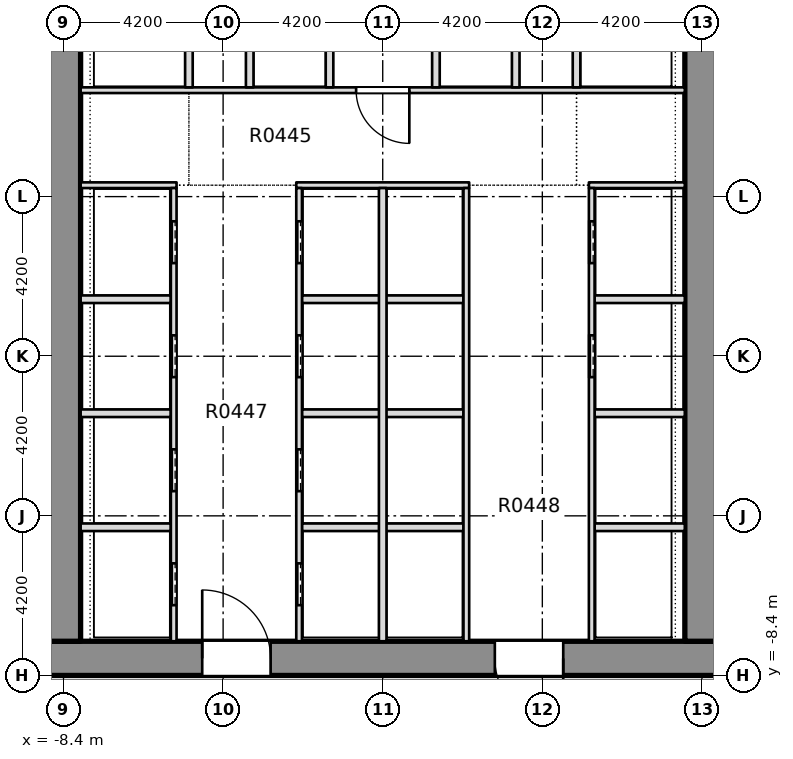
"""IFC4 building model, lengths in metres.
Left out: names, types, materials, properties, quantities, classifications, styles, units other than length and angle.
Written with IfcOpenShell. Run it as: python <this file> out.ifc"""

import sys

from ifc_helpers import new_model, si_unit, direction, frame, frame_2d, origin, place, context, subcontext, project, spatial, rectangle, extrude, element, fill, save


model = new_model("IFC4")
c1 = context("Model", 3, precision=1e-05, world=origin(), true_north=direction((0.0, 1.0)))
c2 = subcontext(c1, "Body", "Model", "MODEL_VIEW")
j1 = project(units=[si_unit("LENGTHUNIT", "METRE"), si_unit("PLANEANGLEUNIT", "RADIAN")], contexts=[c1])
p1 = place(None, origin())
s1 = spatial("IfcSite", under=j1, at=p1, CompositionType="ELEMENT")
p2 = place(p1, origin())
s2 = spatial("IfcBuilding", under=s1, at=p2, CompositionType="ELEMENT")
p3 = place(p2, frame((0.0, 0.0, 25.0)))
s3 = spatial("IfcBuildingStorey", under=s2, at=p3, CompositionType="ELEMENT", Elevation=25.0)
p4 = place(p3, frame((-11.7, -7.95, -0.4), z_axis=(0.0, 0.0, 1.0), x_axis=(1.0, 0.0, 0.0)))
e1 = element("IfcWall", 1, at=p4, inside=s3, PredefinedType="SHEAR", context=c2, shape_type="SweptSolid", body=[
    extrude(rectangle(XDim=23.4, YDim=0.9, at=frame_2d((11.7, 0.0))), origin(), (0.0, 0.0, 1.0), 5.0),
])
p5 = place(p4, frame((6.95, 0.0, 0.4)))
e2 = element("IfcOpeningElement", 2, at=p5, cuts=e1, PredefinedType="OPENING", context=c2, shape_type="SweptSolid", body=[
    extrude(rectangle(XDim=1.8, YDim=2.1, at=frame_2d((0.9, 1.05))), frame((0.0, 0.46, 0.0), z_axis=(0.0, -1.0, 0.0), x_axis=(1.0, 0.0, 0.0)), (0.0, 0.0, 1.0), 0.92),
])
p6 = place(p4, frame((14.65, 0.0, 0.4)))
e3 = element("IfcOpeningElement", 3, at=p6, cuts=e1, PredefinedType="OPENING", context=c2, shape_type="SweptSolid", body=[
    extrude(rectangle(XDim=1.8, YDim=2.1, at=frame_2d((0.9, 1.05))), frame((0.0, 0.46, 0.0), z_axis=(0.0, -1.0, 0.0), x_axis=(1.0, 0.0, 0.0)), (0.0, 0.0, 1.0), 0.92),
])
p7 = place(p3, frame((-8.4, -7.5, -0.4), z_axis=(0.0, 0.0, 1.0), x_axis=(0.0, 1.0, 0.0)))
e4 = element("IfcWall", 4, at=p7, inside=s3, PredefinedType="SHEAR", context=c2, shape_type="SweptSolid", body=[
    extrude(rectangle(XDim=28.35, YDim=0.9, at=frame_2d((14.175, 0.0))), origin(), (0.0, 0.0, 1.0), 5.0),
])
p8 = place(p7, frame((18.4, 0.0, 0.4)))
e5 = element("IfcOpeningElement", 5, at=p8, cuts=e4, PredefinedType="OPENING", context=c2, shape_type="SweptSolid", body=[
    extrude(rectangle(XDim=1.2, YDim=2.1, at=frame_2d((0.6, 1.05))), frame((0.0, 0.46, 0.0), z_axis=(0.0, -1.0, 0.0), x_axis=(1.0, 0.0, 0.0)), (0.0, 0.0, 1.0), 0.92),
])
p9 = place(p3, frame((8.4, -7.5, -0.4), z_axis=(0.0, 0.0, 1.0), x_axis=(0.0, 1.0, 0.0)))
e6 = element("IfcWall", 6, at=p9, inside=s3, PredefinedType="SHEAR", context=c2, shape_type="SweptSolid", body=[
    extrude(rectangle(XDim=28.35, YDim=0.9, at=frame_2d((14.175, 0.0))), origin(), (0.0, 0.0, 1.0), 5.0),
])
p10 = place(p9, frame((18.4, 0.0, 0.4)))
e7 = element("IfcOpeningElement", 7, at=p10, cuts=e6, PredefinedType="OPENING", context=c2, shape_type="SweptSolid", body=[
    extrude(rectangle(XDim=1.2, YDim=2.1, at=frame_2d((0.6, 1.05))), frame((0.0, 0.46, 0.0), z_axis=(0.0, -1.0, 0.0), x_axis=(1.0, 0.0, 0.0)), (0.0, 0.0, 1.0), 0.92),
])
p11 = place(p3, frame((-7.949, -4.5, 0.0), z_axis=(0.0, 0.0, 1.0), x_axis=(1.0, 0.0, 0.0)))
e8 = element("IfcWall", 8, at=p11, inside=s3, PredefinedType="PARTITIONING", context=c2, shape_type="SweptSolid", body=[
    extrude(rectangle(XDim=2.374, YDim=0.2, at=frame_2d((1.187, 0.0))), origin(), (0.0, 0.0, 1.0), 4.6),
])
p12 = place(p3, frame((-2.125, -4.5, 0.0), z_axis=(0.0, 0.0, 1.0), x_axis=(1.0, 0.0, 0.0)))
e9 = element("IfcWall", 9, at=p12, inside=s3, PredefinedType="PARTITIONING", context=c2, shape_type="SweptSolid", body=[
    extrude(rectangle(XDim=4.25, YDim=0.2, at=frame_2d((2.125, 0.0))), origin(), (0.0, 0.0, 1.0), 4.6),
])
for number, where, z_axis, x_axis in (
    (10, (5.575, -4.5, 0.0), (0.0, 0.0, 1.0), (1.0, 0.0, 0.0)),
    (11, (-7.949, -1.5, 0.0), (0.0, 0.0, 1.0), (1.0, 0.0, 0.0)),
):
    element("IfcWall", number, at=place(p3, frame(where, z_axis=z_axis, x_axis=x_axis)), inside=s3, PredefinedType="PARTITIONING", context=c2, shape_type="SweptSolid", body=[
        extrude(rectangle(XDim=2.374, YDim=0.2, at=frame_2d((1.187, 0.0))), origin(), (0.0, 0.0, 1.0), 4.6),
    ])
p13 = place(p3, frame((-2.125, -1.5, 0.0), z_axis=(0.0, 0.0, 1.0), x_axis=(1.0, 0.0, 0.0)))
e12 = element("IfcWall", 12, at=p13, inside=s3, PredefinedType="PARTITIONING", context=c2, shape_type="SweptSolid", body=[
    extrude(rectangle(XDim=4.25, YDim=0.2, at=frame_2d((2.125, 0.0))), origin(), (0.0, 0.0, 1.0), 4.6),
])
for number, where, z_axis, x_axis in (
    (13, (5.575, -1.5, 0.0), (0.0, 0.0, 1.0), (1.0, 0.0, 0.0)),
    (14, (-7.949, 1.5, 0.0), (0.0, 0.0, 1.0), (1.0, 0.0, 0.0)),
):
    element("IfcWall", number, at=place(p3, frame(where, z_axis=z_axis, x_axis=x_axis)), inside=s3, PredefinedType="PARTITIONING", context=c2, shape_type="SweptSolid", body=[
        extrude(rectangle(XDim=2.374, YDim=0.2, at=frame_2d((1.187, 0.0))), origin(), (0.0, 0.0, 1.0), 4.6),
    ])
p14 = place(p3, frame((-2.125, 1.5, 0.0), z_axis=(0.0, 0.0, 1.0), x_axis=(1.0, 0.0, 0.0)))
e15 = element("IfcWall", 15, at=p14, inside=s3, PredefinedType="PARTITIONING", context=c2, shape_type="SweptSolid", body=[
    extrude(rectangle(XDim=4.25, YDim=0.2, at=frame_2d((2.125, 0.0))), origin(), (0.0, 0.0, 1.0), 4.6),
])
p15 = place(p3, frame((5.575, 1.5, 0.0), z_axis=(0.0, 0.0, 1.0), x_axis=(1.0, 0.0, 0.0)))
e16 = element("IfcWall", 16, at=p15, inside=s3, PredefinedType="PARTITIONING", context=c2, shape_type="SweptSolid", body=[
    extrude(rectangle(XDim=2.374, YDim=0.2, at=frame_2d((1.187, 0.0))), origin(), (0.0, 0.0, 1.0), 4.6),
])
p16 = place(p3, frame((-7.949, 4.5, 0.0), z_axis=(0.0, 0.0, 1.0), x_axis=(1.0, 0.0, 0.0)))
e17 = element("IfcWall", 17, at=p16, inside=s3, PredefinedType="PARTITIONING", context=c2, shape_type="SweptSolid", body=[
    extrude(rectangle(XDim=2.524, YDim=0.15, at=frame_2d((1.262, 0.0))), origin(), (0.0, 0.0, 1.0), 4.6),
])
p17 = place(p3, frame((-2.275, 4.5, 0.0), z_axis=(0.0, 0.0, 1.0), x_axis=(1.0, 0.0, 0.0)))
e18 = element("IfcWall", 18, at=p17, inside=s3, PredefinedType="PARTITIONING", context=c2, shape_type="SweptSolid", body=[
    extrude(rectangle(XDim=4.55, YDim=0.15, at=frame_2d((2.275, 0.0))), origin(), (0.0, 0.0, 1.0), 4.6),
])
p18 = place(p3, frame((5.425, 4.5, 0.0), z_axis=(0.0, 0.0, 1.0), x_axis=(1.0, 0.0, 0.0)))
e19 = element("IfcWall", 19, at=p18, inside=s3, PredefinedType="PARTITIONING", context=c2, shape_type="SweptSolid", body=[
    extrude(rectangle(XDim=2.524, YDim=0.15, at=frame_2d((1.262, 0.0))), origin(), (0.0, 0.0, 1.0), 4.6),
])
p19 = place(p3, frame((-7.949, 7.0, 0.0), z_axis=(0.0, 0.0, 1.0), x_axis=(1.0, 0.0, 0.0)))
e20 = element("IfcWall", 20, at=p19, inside=s3, PredefinedType="PARTITIONING", context=c2, shape_type="SweptSolid", body=[
    extrude(rectangle(XDim=15.898, YDim=0.15, at=frame_2d((7.949, 0.0))), origin(), (0.0, 0.0, 1.0), 4.6),
])
p20 = place(p19, frame((7.249, 0.0, 0.0)))
e21 = element("IfcOpeningElement", 21, at=p20, cuts=e20, PredefinedType="OPENING", context=c2, shape_type="SweptSolid", body=[
    extrude(rectangle(XDim=1.4, YDim=2.1, at=frame_2d((0.7, 1.05))), frame((0.0, 0.085, 0.0), z_axis=(0.0, -1.0, 0.0), x_axis=(1.0, 0.0, 0.0)), (0.0, 0.0, 1.0), 0.17),
])
p21 = place(p3, frame((-5.5, -7.499, 0.0), z_axis=(0.0, 0.0, 1.0), x_axis=(0.0, 1.0, 0.0)))
e22 = element("IfcWall", 22, at=p21, inside=s3, PredefinedType="PARTITIONING", context=c2, shape_type="SweptSolid", body=[
    extrude(rectangle(XDim=11.924, YDim=0.15, at=frame_2d((5.962, 0.0))), origin(), (0.0, 0.0, 1.0), 4.6),
])
p22 = place(p21, frame((0.949, 0.0, 0.0)))
e23 = element("IfcOpeningElement", 23, at=p22, cuts=e22, PredefinedType="OPENING", context=c2, shape_type="SweptSolid", body=[
    extrude(rectangle(XDim=1.1, YDim=2.1, at=frame_2d((0.55, 1.05))), frame((0.0, 0.085, 0.0), z_axis=(0.0, -1.0, 0.0), x_axis=(1.0, 0.0, 0.0)), (0.0, 0.0, 1.0), 0.17),
])
p23 = place(p21, frame((3.949, 0.0, 0.0)))
e24 = element("IfcOpeningElement", 24, at=p23, cuts=e22, PredefinedType="OPENING", context=c2, shape_type="SweptSolid", body=[
    extrude(rectangle(XDim=1.1, YDim=2.1, at=frame_2d((0.55, 1.05))), frame((0.0, 0.085, 0.0), z_axis=(0.0, -1.0, 0.0), x_axis=(1.0, 0.0, 0.0)), (0.0, 0.0, 1.0), 0.17),
])
p24 = place(p21, frame((6.949, 0.0, 0.0)))
e25 = element("IfcOpeningElement", 25, at=p24, cuts=e22, PredefinedType="OPENING", context=c2, shape_type="SweptSolid", body=[
    extrude(rectangle(XDim=1.1, YDim=2.1, at=frame_2d((0.55, 1.05))), frame((0.0, 0.085, 0.0), z_axis=(0.0, -1.0, 0.0), x_axis=(1.0, 0.0, 0.0)), (0.0, 0.0, 1.0), 0.17),
])
p25 = place(p21, frame((9.949, 0.0, 0.0)))
e26 = element("IfcOpeningElement", 26, at=p25, cuts=e22, PredefinedType="OPENING", context=c2, shape_type="SweptSolid", body=[
    extrude(rectangle(XDim=1.1, YDim=2.1, at=frame_2d((0.55, 1.05))), frame((0.0, 0.085, 0.0), z_axis=(0.0, -1.0, 0.0), x_axis=(1.0, 0.0, 0.0)), (0.0, 0.0, 1.0), 0.17),
])
p26 = place(p3, frame((-5.1, 7.075, 0.0), z_axis=(0.0, 0.0, 1.0), x_axis=(0.0, 1.0, 0.0)))
e27 = element("IfcWall", 27, at=p26, inside=s3, PredefinedType="PARTITIONING", context=c2, shape_type="SweptSolid", body=[
    extrude(rectangle(XDim=2.725, YDim=0.2, at=frame_2d((1.363, 0.0))), origin(), (0.0, 0.0, 1.0), 4.6),
])
p27 = place(p3, frame((-3.5, 7.075, 0.0), z_axis=(0.0, 0.0, 1.0), x_axis=(0.0, 1.0, 0.0)))
e28 = element("IfcWall", 28, at=p27, inside=s3, PredefinedType="PARTITIONING", context=c2, shape_type="SweptSolid", body=[
    extrude(rectangle(XDim=2.85, YDim=0.2, at=frame_2d((1.425, 0.0))), origin(), (0.0, 0.0, 1.0), 4.6),
])
p28 = place(p3, frame((-2.2, -7.499, 0.0), z_axis=(0.0, 0.0, 1.0), x_axis=(0.0, 1.0, 0.0)))
e29 = element("IfcWall", 29, at=p28, inside=s3, PredefinedType="PARTITIONING", context=c2, shape_type="SweptSolid", body=[
    extrude(rectangle(XDim=11.924, YDim=0.15, at=frame_2d((5.962, 0.0))), origin(), (0.0, 0.0, 1.0), 4.6),
])
p29 = place(p28, frame((0.949, 0.0, 0.0)))
e30 = element("IfcOpeningElement", 30, at=p29, cuts=e29, PredefinedType="OPENING", context=c2, shape_type="SweptSolid", body=[
    extrude(rectangle(XDim=1.1, YDim=2.1, at=frame_2d((0.55, 1.05))), frame((0.0, 0.085, 0.0), z_axis=(0.0, -1.0, 0.0), x_axis=(1.0, 0.0, 0.0)), (0.0, 0.0, 1.0), 0.17),
])
p30 = place(p28, frame((3.949, 0.0, 0.0)))
e31 = element("IfcOpeningElement", 31, at=p30, cuts=e29, PredefinedType="OPENING", context=c2, shape_type="SweptSolid", body=[
    extrude(rectangle(XDim=1.1, YDim=2.1, at=frame_2d((0.55, 1.05))), frame((0.0, 0.085, 0.0), z_axis=(0.0, -1.0, 0.0), x_axis=(1.0, 0.0, 0.0)), (0.0, 0.0, 1.0), 0.17),
])
p31 = place(p28, frame((6.949, 0.0, 0.0)))
e32 = element("IfcOpeningElement", 32, at=p31, cuts=e29, PredefinedType="OPENING", context=c2, shape_type="SweptSolid", body=[
    extrude(rectangle(XDim=1.1, YDim=2.1, at=frame_2d((0.55, 1.05))), frame((0.0, 0.085, 0.0), z_axis=(0.0, -1.0, 0.0), x_axis=(1.0, 0.0, 0.0)), (0.0, 0.0, 1.0), 0.17),
])
p32 = place(p28, frame((9.949, 0.0, 0.0)))
e33 = element("IfcOpeningElement", 33, at=p32, cuts=e29, PredefinedType="OPENING", context=c2, shape_type="SweptSolid", body=[
    extrude(rectangle(XDim=1.1, YDim=2.1, at=frame_2d((0.55, 1.05))), frame((0.0, 0.085, 0.0), z_axis=(0.0, -1.0, 0.0), x_axis=(1.0, 0.0, 0.0)), (0.0, 0.0, 1.0), 0.17),
])
p33 = place(p3, frame((-1.4, 7.075, 0.0), z_axis=(0.0, 0.0, 1.0), x_axis=(0.0, 1.0, 0.0)))
e34 = element("IfcWall", 34, at=p33, inside=s3, PredefinedType="PARTITIONING", context=c2, shape_type="SweptSolid", body=[
    extrude(rectangle(XDim=2.85, YDim=0.2, at=frame_2d((1.425, 0.0))), origin(), (0.0, 0.0, 1.0), 4.6),
])
p34 = place(p3, frame((0.0, -7.499, 0.0), z_axis=(0.0, 0.0, 1.0), x_axis=(0.0, 1.0, 0.0)))
e35 = element("IfcWall", 35, at=p34, inside=s3, PredefinedType="PARTITIONING", context=c2, shape_type="SweptSolid", body=[
    extrude(rectangle(XDim=11.924, YDim=0.2, at=frame_2d((5.962, 0.0))), origin(), (0.0, 0.0, 1.0), 4.6),
])
p35 = place(p3, frame((1.4, 7.075, 0.0), z_axis=(0.0, 0.0, 1.0), x_axis=(0.0, 1.0, 0.0)))
e36 = element("IfcWall", 36, at=p35, inside=s3, PredefinedType="PARTITIONING", context=c2, shape_type="SweptSolid", body=[
    extrude(rectangle(XDim=2.85, YDim=0.2, at=frame_2d((1.425, 0.0))), origin(), (0.0, 0.0, 1.0), 4.6),
])
p36 = place(p3, frame((2.2, -7.499, 0.0), z_axis=(0.0, 0.0, 1.0), x_axis=(0.0, 1.0, 0.0)))
e37 = element("IfcWall", 37, at=p36, inside=s3, PredefinedType="PARTITIONING", context=c2, shape_type="SweptSolid", body=[
    extrude(rectangle(XDim=11.924, YDim=0.15, at=frame_2d((5.962, 0.0))), origin(), (0.0, 0.0, 1.0), 4.6),
])
p37 = place(p3, frame((3.5, 7.075, 0.0), z_axis=(0.0, 0.0, 1.0), x_axis=(0.0, 1.0, 0.0)))
e38 = element("IfcWall", 38, at=p37, inside=s3, PredefinedType="PARTITIONING", context=c2, shape_type="SweptSolid", body=[
    extrude(rectangle(XDim=2.85, YDim=0.2, at=frame_2d((1.425, 0.0))), origin(), (0.0, 0.0, 1.0), 4.6),
])
p38 = place(p3, frame((5.1, 7.075, 0.0), z_axis=(0.0, 0.0, 1.0), x_axis=(0.0, 1.0, 0.0)))
e39 = element("IfcWall", 39, at=p38, inside=s3, PredefinedType="PARTITIONING", context=c2, shape_type="SweptSolid", body=[
    extrude(rectangle(XDim=2.725, YDim=0.2, at=frame_2d((1.363, 0.0))), origin(), (0.0, 0.0, 1.0), 4.6),
])
p39 = place(p3, frame((5.5, -7.499, 0.0), z_axis=(0.0, 0.0, 1.0), x_axis=(0.0, 1.0, 0.0)))
e40 = element("IfcWall", 40, at=p39, inside=s3, PredefinedType="PARTITIONING", context=c2, shape_type="SweptSolid", body=[
    extrude(rectangle(XDim=11.924, YDim=0.15, at=frame_2d((5.962, 0.0))), origin(), (0.0, 0.0, 1.0), 4.6),
])
p40 = place(p39, frame((6.949, 0.0, 0.0)))
e41 = element("IfcOpeningElement", 41, at=p40, cuts=e40, PredefinedType="OPENING", context=c2, shape_type="SweptSolid", body=[
    extrude(rectangle(XDim=1.1, YDim=2.1, at=frame_2d((0.55, 1.05))), frame((0.0, 0.085, 0.0), z_axis=(0.0, -1.0, 0.0), x_axis=(1.0, 0.0, 0.0)), (0.0, 0.0, 1.0), 0.17),
])
p41 = place(p39, frame((9.949, 0.0, 0.0)))
e42 = element("IfcOpeningElement", 42, at=p41, cuts=e40, PredefinedType="OPENING", context=c2, shape_type="SweptSolid", body=[
    extrude(rectangle(XDim=1.1, YDim=2.1, at=frame_2d((0.55, 1.05))), frame((0.0, 0.085, 0.0), z_axis=(0.0, -1.0, 0.0), x_axis=(1.0, 0.0, 0.0)), (0.0, 0.0, 1.0), 0.17),
])
p42 = place(p22, origin())
e43 = element("IfcDoor", 43, at=p42, inside=s3, OperationType="SLIDING_TO_RIGHT", PredefinedType="DOOR", context=c2, shape_type="SweptSolid", body=[
    extrude(rectangle(XDim=1.1, YDim=2.1, at=frame_2d((0.55, 1.05))), frame((0.0, 0.025, 0.0), z_axis=(0.0, -1.0, 0.0), x_axis=(1.0, 0.0, 0.0)), (0.0, 0.0, 1.0), 0.05),
])
fill(e23, e43)
p43 = place(p23, origin())
e44 = element("IfcDoor", 44, at=p43, inside=s3, OperationType="SLIDING_TO_RIGHT", PredefinedType="DOOR", context=c2, shape_type="SweptSolid", body=[
    extrude(rectangle(XDim=1.1, YDim=2.1, at=frame_2d((0.55, 1.05))), frame((0.0, 0.025, 0.0), z_axis=(0.0, -1.0, 0.0), x_axis=(1.0, 0.0, 0.0)), (0.0, 0.0, 1.0), 0.05),
])
fill(e24, e44)
p44 = place(p24, origin())
e45 = element("IfcDoor", 45, at=p44, inside=s3, OperationType="SLIDING_TO_RIGHT", PredefinedType="DOOR", context=c2, shape_type="SweptSolid", body=[
    extrude(rectangle(XDim=1.1, YDim=2.1, at=frame_2d((0.55, 1.05))), frame((0.0, 0.025, 0.0), z_axis=(0.0, -1.0, 0.0), x_axis=(1.0, 0.0, 0.0)), (0.0, 0.0, 1.0), 0.05),
])
fill(e25, e45)
p45 = place(p25, origin())
e46 = element("IfcDoor", 46, at=p45, inside=s3, OperationType="SLIDING_TO_RIGHT", PredefinedType="DOOR", context=c2, shape_type="SweptSolid", body=[
    extrude(rectangle(XDim=1.1, YDim=2.1, at=frame_2d((0.55, 1.05))), frame((0.0, 0.025, 0.0), z_axis=(0.0, -1.0, 0.0), x_axis=(1.0, 0.0, 0.0)), (0.0, 0.0, 1.0), 0.05),
])
fill(e26, e46)
p46 = place(p29, origin())
e47 = element("IfcDoor", 47, at=p46, inside=s3, OperationType="SLIDING_TO_RIGHT", PredefinedType="DOOR", context=c2, shape_type="SweptSolid", body=[
    extrude(rectangle(XDim=1.1, YDim=2.1, at=frame_2d((0.55, 1.05))), frame((0.0, 0.025, 0.0), z_axis=(0.0, -1.0, 0.0), x_axis=(1.0, 0.0, 0.0)), (0.0, 0.0, 1.0), 0.05),
])
fill(e30, e47)
p47 = place(p30, origin())
e48 = element("IfcDoor", 48, at=p47, inside=s3, OperationType="SLIDING_TO_RIGHT", PredefinedType="DOOR", context=c2, shape_type="SweptSolid", body=[
    extrude(rectangle(XDim=1.1, YDim=2.1, at=frame_2d((0.55, 1.05))), frame((0.0, 0.025, 0.0), z_axis=(0.0, -1.0, 0.0), x_axis=(1.0, 0.0, 0.0)), (0.0, 0.0, 1.0), 0.05),
])
fill(e31, e48)
p48 = place(p31, origin())
e49 = element("IfcDoor", 49, at=p48, inside=s3, OperationType="SLIDING_TO_RIGHT", PredefinedType="DOOR", context=c2, shape_type="SweptSolid", body=[
    extrude(rectangle(XDim=1.1, YDim=2.1, at=frame_2d((0.55, 1.05))), frame((0.0, 0.025, 0.0), z_axis=(0.0, -1.0, 0.0), x_axis=(1.0, 0.0, 0.0)), (0.0, 0.0, 1.0), 0.05),
])
fill(e32, e49)
p49 = place(p32, origin())
e50 = element("IfcDoor", 50, at=p49, inside=s3, OperationType="SLIDING_TO_RIGHT", PredefinedType="DOOR", context=c2, shape_type="SweptSolid", body=[
    extrude(rectangle(XDim=1.1, YDim=2.1, at=frame_2d((0.55, 1.05))), frame((0.0, 0.025, 0.0), z_axis=(0.0, -1.0, 0.0), x_axis=(1.0, 0.0, 0.0)), (0.0, 0.0, 1.0), 0.05),
])
fill(e33, e50)
p50 = place(p40, origin())
e51 = element("IfcDoor", 51, at=p50, inside=s3, OperationType="SLIDING_TO_RIGHT", PredefinedType="DOOR", context=c2, shape_type="SweptSolid", body=[
    extrude(rectangle(XDim=1.1, YDim=2.1, at=frame_2d((0.55, 1.05))), frame((0.0, 0.025, 0.0), z_axis=(0.0, -1.0, 0.0), x_axis=(1.0, 0.0, 0.0)), (0.0, 0.0, 1.0), 0.05),
])
fill(e41, e51)
p51 = place(p41, origin())
e52 = element("IfcDoor", 52, at=p51, inside=s3, OperationType="SLIDING_TO_RIGHT", PredefinedType="DOOR", context=c2, shape_type="SweptSolid", body=[
    extrude(rectangle(XDim=1.1, YDim=2.1, at=frame_2d((0.55, 1.05))), frame((0.0, 0.025, 0.0), z_axis=(0.0, -1.0, 0.0), x_axis=(1.0, 0.0, 0.0)), (0.0, 0.0, 1.0), 0.05),
])
fill(e42, e52)
p52 = place(p20, origin())
e53 = element("IfcDoor", 53, at=p52, inside=s3, OperationType="SINGLE_SWING_RIGHT", PredefinedType="DOOR", context=c2, shape_type="SweptSolid", body=[
    extrude(rectangle(XDim=1.4, YDim=2.1, at=frame_2d((0.7, 1.05))), frame((0.0, 0.025, 0.0), z_axis=(0.0, -1.0, 0.0), x_axis=(1.0, 0.0, 0.0)), (0.0, 0.0, 1.0), 0.05),
])
fill(e21, e53)
p53 = place(p5, origin())
e54 = element("IfcDoor", 54, at=p53, inside=s3, OperationType="SINGLE_SWING_LEFT", PredefinedType="DOOR", context=c2, shape_type="SweptSolid", body=[
    extrude(rectangle(XDim=1.8, YDim=2.1, at=frame_2d((0.9, 1.05))), frame((0.0, 0.025, 0.0), z_axis=(0.0, -1.0, 0.0), x_axis=(1.0, 0.0, 0.0)), (0.0, 0.0, 1.0), 0.05),
])
fill(e2, e54)
p54 = place(p6, origin())
e55 = element("IfcDoor", 55, at=p54, inside=s3, OperationType="SINGLE_SWING_LEFT", PredefinedType="DOOR", context=c2, shape_type="SweptSolid", body=[
    extrude(rectangle(XDim=1.8, YDim=2.1, at=frame_2d((0.9, 1.05))), frame((0.0, 0.025, 0.0), z_axis=(0.0, -1.0, 0.0), x_axis=(1.0, 0.0, 0.0)), (0.0, 0.0, 1.0), 0.05),
])
fill(e3, e55)
save(model, sys.argv[1])
